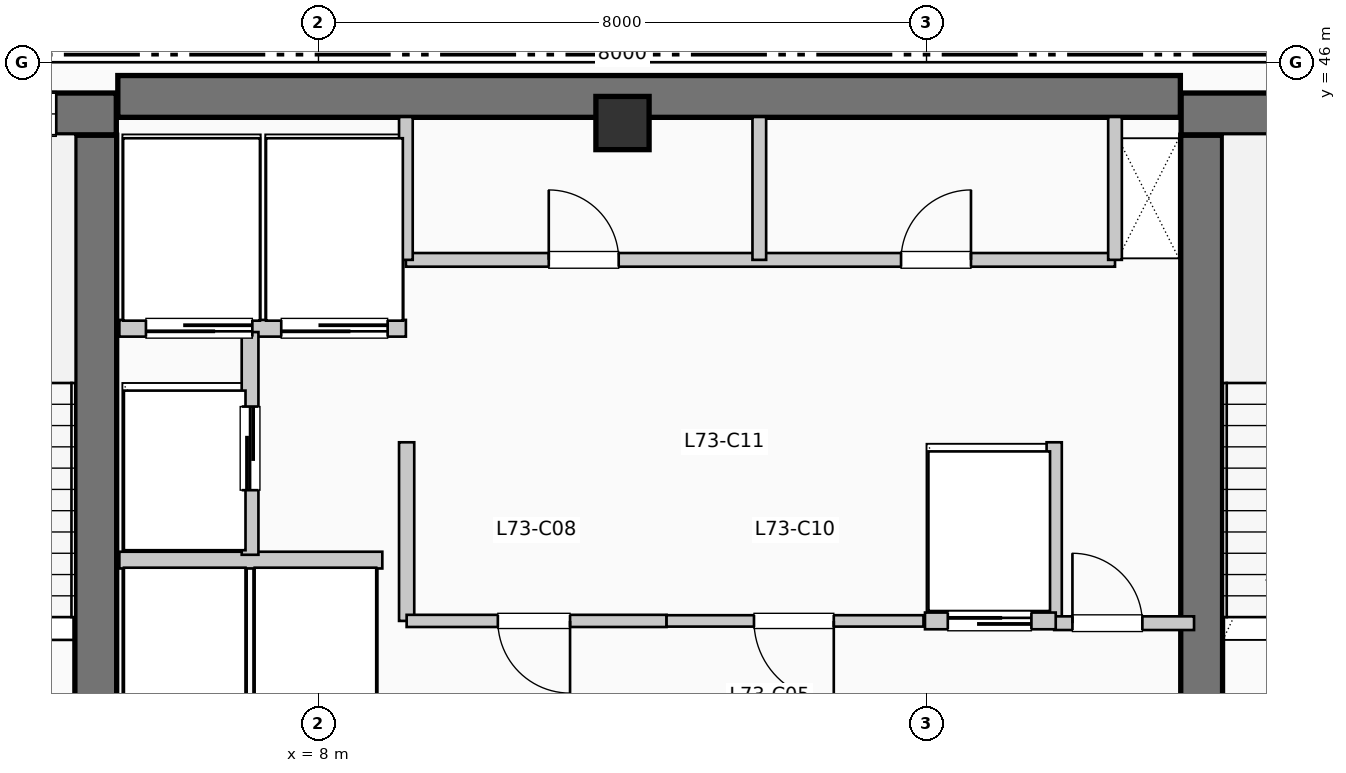
"""IFC4 building model, lengths in metres.
Left out: names, types, materials, properties, quantities, classifications, styles, units other than length and angle.
Written with IfcOpenShell. Run it as: python <this file> out.ifc"""

import sys

from ifc_helpers import new_model, si_unit, direction, frame, frame_2d, origin, origin_2d, place, context, subcontext, project, spatial, rectangle, extrude, element, fill, save


model = new_model("IFC4")
c1 = context("Model", 3, precision=1e-05, world=origin(), true_north=direction((0.0, 1.0)))
c2 = subcontext(c1, "Body", "Model", "MODEL_VIEW")
j1 = project(units=[si_unit("LENGTHUNIT", "METRE"), si_unit("PLANEANGLEUNIT", "RADIAN")], contexts=[c1])
p1 = place(None, origin())
s1 = spatial("IfcSite", under=j1, at=p1, CompositionType="ELEMENT")
p2 = place(p1, origin())
s2 = spatial("IfcBuilding", under=s1, at=p2, CompositionType="ELEMENT")
p3 = place(p2, frame((0.0, 0.0, 299.97)))
s3 = spatial("IfcBuildingStorey", under=s2, at=p3, CompositionType="ELEMENT", Elevation=299.97)
p4 = place(p3, frame((5.36, 45.55, 0.0), z_axis=(0.0, 0.0, 1.0), x_axis=(1.0, 0.0, 0.0)))
e1 = element("IfcWall", 1, at=p4, inside=s3, PredefinedType="SHEAR", context=c2, shape_type="SweptSolid", body=[
    extrude(rectangle(XDim=13.98, YDim=0.55, at=frame_2d((6.99, 0.0))), origin(), (0.0, 0.0, 1.0), 3.96),
])
p5 = place(p3, frame((5.07, 37.15, 0.0), z_axis=(0.0, 0.0, 1.0), x_axis=(0.0, 1.0, 0.0)))
e2 = element("IfcWall", 2, at=p5, inside=s3, PredefinedType="SHEAR", context=c2, shape_type="SweptSolid", body=[
    extrude(rectangle(XDim=7.89, YDim=0.55, at=frame_2d((3.945, 0.0))), origin(), (0.0, 0.0, 1.0), 3.96),
])
p6 = place(p3, frame((1.1, 45.32, 0.0), z_axis=(0.0, 0.0, 1.0), x_axis=(1.0, 0.0, 0.0)))
e3 = element("IfcWall", 3, at=p6, inside=s3, PredefinedType="SHEAR", context=c2, shape_type="SweptSolid", body=[
    extrude(rectangle(XDim=4.24, YDim=0.55, at=frame_2d((2.12, 0.0))), origin(), (0.0, 0.0, 1.0), 3.96),
])
p7 = place(p6, frame((2.05, 0.0, 1.05)))
e4 = element("IfcOpeningElement", 4, at=p7, cuts=e3, PredefinedType="OPENING", context=c2, shape_type="SweptSolid", body=[
    extrude(rectangle(XDim=1.4, YDim=1.8, at=frame_2d((0.7, 0.9))), frame((0.0, 0.285, 0.0), z_axis=(0.0, -1.0, 0.0), x_axis=(1.0, 0.0, 0.0)), (0.0, 0.0, 1.0), 0.57),
])
p8 = place(p3, frame((19.62, 37.15, 0.0), z_axis=(0.0, 0.0, 1.0), x_axis=(0.0, 1.0, 0.0)))
e5 = element("IfcWall", 5, at=p8, inside=s3, PredefinedType="SHEAR", context=c2, shape_type="SweptSolid", body=[
    extrude(rectangle(XDim=7.89, YDim=0.55, at=frame_2d((3.945, 0.0))), origin(), (0.0, 0.0, 1.0), 3.96),
])
p9 = place(p3, frame((19.35, 45.32, 0.0), z_axis=(0.0, 0.0, 1.0), x_axis=(1.0, 0.0, 0.0)))
e6 = element("IfcWall", 6, at=p9, inside=s3, PredefinedType="SHEAR", context=c2, shape_type="SweptSolid", body=[
    extrude(rectangle(XDim=3.69, YDim=0.55, at=frame_2d((1.845, 0.0))), origin(), (0.0, 0.0, 1.0), 3.96),
])
p10 = place(p9, frame((1.15, 0.0, 1.05)))
e7 = element("IfcOpeningElement", 7, at=p10, cuts=e6, PredefinedType="OPENING", context=c2, shape_type="SweptSolid", body=[
    extrude(rectangle(XDim=1.4, YDim=1.8, at=frame_2d((0.7, 0.9))), frame((0.0, 0.285, 0.0), z_axis=(0.0, -1.0, 0.0), x_axis=(1.0, 0.0, 0.0)), (0.0, 0.0, 1.0), 0.57),
])
p11 = place(p3, frame((12.0, 45.2, 0.0), z_axis=(0.0, 0.0, 1.0), x_axis=(1.0, 0.0, 0.0)))
e8 = element("IfcColumn", 8, at=p11, inside=s3, PredefinedType="COLUMN", context=c2, shape_type="SweptSolid", body=[
    extrude(rectangle(XDim=0.7, YDim=0.7, at=origin_2d()), origin(), (0.0, 0.0, 1.0), 3.96),
])
p12 = place(p3, frame((5.38, 39.45, 0.0), z_axis=(0.0, 0.0, 1.0), x_axis=(1.0, 0.0, 0.0)))
e9 = element("IfcWall", 9, at=p12, inside=s3, PredefinedType="PARTITIONING", context=c2, shape_type="SweptSolid", body=[
    extrude(rectangle(XDim=3.46, YDim=0.22, at=frame_2d((1.73, 0.0))), origin(), (0.0, 0.0, 1.0), 3.74),
])
p13 = place(p3, frame((5.38, 42.5, 0.0), z_axis=(0.0, 0.0, 1.0), x_axis=(1.0, 0.0, 0.0)))
e10 = element("IfcWall", 10, at=p13, inside=s3, PredefinedType="PARTITIONING", context=c2, shape_type="SweptSolid", body=[
    extrude(rectangle(XDim=3.77, YDim=0.22, at=frame_2d((1.885, 0.0))), origin(), (0.0, 0.0, 1.0), 3.74),
])
p14 = place(p13, frame((1.75, 0.0, 0.0), z_axis=(0.0, 0.0, 1.0), x_axis=(-1.0, 0.0, 0.0)))
e11 = element("IfcOpeningElement", 11, at=p14, cuts=e10, PredefinedType="OPENING", context=c2, shape_type="SweptSolid", body=[
    extrude(rectangle(XDim=1.4, YDim=2.2, at=frame_2d((0.7, 1.1))), frame((0.0, 0.12, 0.0), z_axis=(0.0, -1.0, 0.0), x_axis=(1.0, 0.0, 0.0)), (0.0, 0.0, 1.0), 0.24),
])
p15 = place(p13, frame((3.53, 0.0, 0.0), z_axis=(0.0, 0.0, 1.0), x_axis=(-1.0, 0.0, 0.0)))
e12 = element("IfcOpeningElement", 12, at=p15, cuts=e10, PredefinedType="OPENING", context=c2, shape_type="SweptSolid", body=[
    extrude(rectangle(XDim=1.4, YDim=2.2, at=frame_2d((0.7, 1.1))), frame((0.0, 0.12, 0.0), z_axis=(0.0, -1.0, 0.0), x_axis=(1.0, 0.0, 0.0)), (0.0, 0.0, 1.0), 0.24),
])
p16 = place(p3, frame((7.1, 39.52, 0.0), z_axis=(0.0, 0.0, 1.0), x_axis=(0.0, 1.0, 0.0)))
e13 = element("IfcWall", 13, at=p16, inside=s3, PredefinedType="PARTITIONING", context=c2, shape_type="SweptSolid", body=[
    extrude(rectangle(XDim=2.93, YDim=0.22, at=frame_2d((1.465, 0.0))), origin(), (0.0, 0.0, 1.0), 3.74),
])
p17 = place(p16, frame((0.85, 0.0, 0.0)))
e14 = element("IfcOpeningElement", 14, at=p17, cuts=e13, PredefinedType="OPENING", context=c2, shape_type="SweptSolid", body=[
    extrude(rectangle(XDim=1.1, YDim=2.2, at=frame_2d((0.55, 1.1))), frame((0.0, 0.12, 0.0), z_axis=(0.0, -1.0, 0.0), x_axis=(1.0, 0.0, 0.0)), (0.0, 0.0, 1.0), 0.24),
])
for number, where, z_axis, x_axis in (
    (15, (9.16, 38.65, 0.0), (0.0, 0.0, 1.0), (0.0, 1.0, 0.0)),
    (16, (17.68, 38.65, 0.0), (0.0, 0.0, 1.0), (0.0, 1.0, 0.0)),
):
    element("IfcWall", number, at=place(p3, frame(where, z_axis=z_axis, x_axis=x_axis)), inside=s3, PredefinedType="PARTITIONING", context=c2, shape_type="SweptSolid", body=[
        extrude(rectangle(XDim=2.35, YDim=0.2, at=frame_2d((1.175, 0.0))), origin(), (0.0, 0.0, 1.0), 3.74),
    ])
p18 = place(p3, frame((17.68, 38.62, 0.0), z_axis=(0.0, 0.0, 1.0), x_axis=(1.0, 0.0, 0.0)))
e17 = element("IfcWall", 17, at=p18, inside=s3, PredefinedType="PARTITIONING", context=c2, shape_type="SweptSolid", body=[
    extrude(rectangle(XDim=1.84, YDim=0.18, at=frame_2d((0.92, 0.0))), origin(), (0.0, 0.0, 1.0), 3.74),
])
p19 = place(p18, frame((0.24, 0.0, 0.0)))
e18 = element("IfcOpeningElement", 18, at=p19, cuts=e17, PredefinedType="OPENING", context=c2, shape_type="SweptSolid", body=[
    extrude(rectangle(XDim=0.92, YDim=2.1, at=frame_2d((0.46, 1.05))), frame((0.0, 0.1, 0.0), z_axis=(0.0, -1.0, 0.0), x_axis=(1.0, 0.0, 0.0)), (0.0, 0.0, 1.0), 0.2),
])
p20 = place(p3, frame((9.16, 38.65, 0.0), z_axis=(0.0, 0.0, 1.0), x_axis=(1.0, 0.0, 0.0)))
e19 = element("IfcWall", 19, at=p20, inside=s3, PredefinedType="PARTITIONING", context=c2, shape_type="SweptSolid", body=[
    extrude(rectangle(XDim=3.42, YDim=0.16, at=frame_2d((1.71, 0.0))), origin(), (0.0, 0.0, 1.0), 3.74),
])
p21 = place(p20, frame((2.15, 0.0, 0.0), z_axis=(0.0, 0.0, 1.0), x_axis=(-1.0, 0.0, 0.0)))
e20 = element("IfcOpeningElement", 20, at=p21, cuts=e19, PredefinedType="OPENING", context=c2, shape_type="SweptSolid", body=[
    extrude(rectangle(XDim=0.95, YDim=2.15, at=frame_2d((0.475, 1.075))), frame((0.0, 0.09, 0.0), z_axis=(0.0, -1.0, 0.0), x_axis=(1.0, 0.0, 0.0)), (0.0, 0.0, 1.0), 0.18),
])
p22 = place(p3, frame((12.58, 38.65, 0.0), z_axis=(0.0, 0.0, 1.0), x_axis=(1.0, 0.0, 0.0)))
e21 = element("IfcWall", 21, at=p22, inside=s3, PredefinedType="PARTITIONING", context=c2, shape_type="SweptSolid", body=[
    extrude(rectangle(XDim=3.38, YDim=0.15, at=frame_2d((1.69, 0.0))), origin(), (0.0, 0.0, 1.0), 3.74),
])
p23 = place(p22, frame((2.2, 0.0, 0.0), z_axis=(0.0, 0.0, 1.0), x_axis=(-1.0, 0.0, 0.0)))
e22 = element("IfcOpeningElement", 22, at=p23, cuts=e21, PredefinedType="OPENING", context=c2, shape_type="SweptSolid", body=[
    extrude(rectangle(XDim=1.05, YDim=2.15, at=frame_2d((0.525, 1.075))), frame((0.0, 0.085, 0.0), z_axis=(0.0, -1.0, 0.0), x_axis=(1.0, 0.0, 0.0)), (0.0, 0.0, 1.0), 0.17),
])
p24 = place(p3, frame((15.98, 38.65, 0.0), z_axis=(0.0, 0.0, 1.0), x_axis=(1.0, 0.0, 0.0)))
e23 = element("IfcWall", 23, at=p24, inside=s3, PredefinedType="PARTITIONING", context=c2, shape_type="SweptSolid", body=[
    extrude(rectangle(XDim=1.72, YDim=0.22, at=frame_2d((0.86, 0.0))), origin(), (0.0, 0.0, 1.0), 3.74),
])
p25 = place(p24, frame((0.3, 0.0, 0.0)))
e24 = element("IfcOpeningElement", 24, at=p25, cuts=e23, PredefinedType="OPENING", context=c2, shape_type="SweptSolid", body=[
    extrude(rectangle(XDim=1.1, YDim=2.2, at=frame_2d((0.55, 1.1))), frame((0.0, 0.12, 0.0), z_axis=(0.0, -1.0, 0.0), x_axis=(1.0, 0.0, 0.0)), (0.0, 0.0, 1.0), 0.24),
])
p26 = place(p3, frame((9.15, 43.4, 0.0), z_axis=(0.0, 0.0, 1.0), x_axis=(1.0, 0.0, 0.0)))
e25 = element("IfcWall", 25, at=p26, inside=s3, PredefinedType="PLUMBINGWALL", context=c2, shape_type="SweptSolid", body=[
    extrude(rectangle(XDim=9.33, YDim=0.18, at=frame_2d((4.665, 0.0))), origin(), (0.0, 0.0, 1.0), 3.74),
])
p27 = place(p26, frame((1.88, 0.0, 0.0)))
e26 = element("IfcOpeningElement", 26, at=p27, cuts=e25, PredefinedType="OPENING", context=c2, shape_type="SweptSolid", body=[
    extrude(rectangle(XDim=0.92, YDim=2.1, at=frame_2d((0.46, 1.05))), frame((0.0, 0.1, 0.0), z_axis=(0.0, -1.0, 0.0), x_axis=(1.0, 0.0, 0.0)), (0.0, 0.0, 1.0), 0.2),
])
p28 = place(p26, frame((6.515, 0.0, 0.0)))
e27 = element("IfcOpeningElement", 27, at=p28, cuts=e25, PredefinedType="OPENING", context=c2, shape_type="SweptSolid", body=[
    extrude(rectangle(XDim=0.92, YDim=2.1, at=frame_2d((0.46, 1.05))), frame((0.0, 0.1, 0.0), z_axis=(0.0, -1.0, 0.0), x_axis=(1.0, 0.0, 0.0)), (0.0, 0.0, 1.0), 0.2),
])
for number, where, z_axis, x_axis in (
    (28, (9.15, 43.4, 0.0), (0.0, 0.0, 1.0), (0.0, 1.0, 0.0)),
    (29, (18.48, 43.4, 0.0), (0.0, 0.0, 1.0), (0.0, 1.0, 0.0)),
    (30, (13.8, 43.4, 0.0), (0.0, 0.0, 1.0), (0.0, 1.0, 0.0)),
):
    element("IfcWall", number, at=place(p3, frame(where, z_axis=z_axis, x_axis=x_axis)), inside=s3, PredefinedType="PLUMBINGWALL", context=c2, shape_type="SweptSolid", body=[
        extrude(rectangle(XDim=1.88, YDim=0.18, at=frame_2d((0.94, 0.0))), origin(), (0.0, 0.0, 1.0), 3.74),
    ])
p29 = place(p7, origin())
e31 = element("IfcWindow", 31, at=p29, inside=s3, PartitioningType="SINGLE_PANEL", PredefinedType="WINDOW", context=c2, shape_type="SweptSolid", body=[
    extrude(rectangle(XDim=1.4, YDim=1.8, at=frame_2d((0.7, 0.9))), frame((0.0, 0.03, 0.0), z_axis=(0.0, -1.0, 0.0), x_axis=(1.0, 0.0, 0.0)), (0.0, 0.0, 1.0), 0.06),
])
fill(e4, e31)
p30 = place(p14, origin())
e32 = element("IfcDoor", 32, at=p30, inside=s3, OperationType="SLIDING_TO_LEFT", PredefinedType="DOOR", context=c2, shape_type="SweptSolid", body=[
    extrude(rectangle(XDim=1.4, YDim=2.2, at=frame_2d((0.7, 1.1))), frame((0.0, 0.025, 0.0), z_axis=(0.0, -1.0, 0.0), x_axis=(1.0, 0.0, 0.0)), (0.0, 0.0, 1.0), 0.05),
])
fill(e11, e32)
p31 = place(p15, origin())
e33 = element("IfcDoor", 33, at=p31, inside=s3, OperationType="SLIDING_TO_LEFT", PredefinedType="DOOR", context=c2, shape_type="SweptSolid", body=[
    extrude(rectangle(XDim=1.4, YDim=2.2, at=frame_2d((0.7, 1.1))), frame((0.0, 0.025, 0.0), z_axis=(0.0, -1.0, 0.0), x_axis=(1.0, 0.0, 0.0)), (0.0, 0.0, 1.0), 0.05),
])
fill(e12, e33)
p32 = place(p17, origin())
e34 = element("IfcDoor", 34, at=p32, inside=s3, OperationType="SLIDING_TO_LEFT", PredefinedType="DOOR", context=c2, shape_type="SweptSolid", body=[
    extrude(rectangle(XDim=1.1, YDim=2.2, at=frame_2d((0.55, 1.1))), frame((0.0, 0.025, 0.0), z_axis=(0.0, -1.0, 0.0), x_axis=(1.0, 0.0, 0.0)), (0.0, 0.0, 1.0), 0.05),
])
fill(e14, e34)
p33 = place(p19, origin())
e35 = element("IfcDoor", 35, at=p33, inside=s3, OperationType="SINGLE_SWING_LEFT", PredefinedType="DOOR", context=c2, shape_type="SweptSolid", body=[
    extrude(rectangle(XDim=0.92, YDim=2.1, at=frame_2d((0.46, 1.05))), frame((0.0, 0.025, 0.0), z_axis=(0.0, -1.0, 0.0), x_axis=(1.0, 0.0, 0.0)), (0.0, 0.0, 1.0), 0.05),
])
fill(e18, e35)
p34 = place(p21, origin())
e36 = element("IfcDoor", 36, at=p34, inside=s3, OperationType="SINGLE_SWING_RIGHT", PredefinedType="DOOR", context=c2, shape_type="SweptSolid", body=[
    extrude(rectangle(XDim=0.95, YDim=2.15, at=frame_2d((0.475, 1.075))), frame((0.0, 0.025, 0.0), z_axis=(0.0, -1.0, 0.0), x_axis=(1.0, 0.0, 0.0)), (0.0, 0.0, 1.0), 0.05),
])
fill(e20, e36)
p35 = place(p23, origin())
e37 = element("IfcDoor", 37, at=p35, inside=s3, OperationType="SINGLE_SWING_RIGHT", PredefinedType="DOOR", context=c2, shape_type="SweptSolid", body=[
    extrude(rectangle(XDim=1.05, YDim=2.15, at=frame_2d((0.525, 1.075))), frame((0.0, 0.025, 0.0), z_axis=(0.0, -1.0, 0.0), x_axis=(1.0, 0.0, 0.0)), (0.0, 0.0, 1.0), 0.05),
])
fill(e22, e37)
p36 = place(p25, origin())
e38 = element("IfcDoor", 38, at=p36, inside=s3, OperationType="SLIDING_TO_LEFT", PredefinedType="DOOR", context=c2, shape_type="SweptSolid", body=[
    extrude(rectangle(XDim=1.1, YDim=2.2, at=frame_2d((0.55, 1.1))), frame((0.0, 0.025, 0.0), z_axis=(0.0, -1.0, 0.0), x_axis=(1.0, 0.0, 0.0)), (0.0, 0.0, 1.0), 0.05),
])
fill(e24, e38)
p37 = place(p27, origin())
e39 = element("IfcDoor", 39, at=p37, inside=s3, OperationType="SINGLE_SWING_LEFT", PredefinedType="DOOR", context=c2, shape_type="SweptSolid", body=[
    extrude(rectangle(XDim=0.92, YDim=2.1, at=frame_2d((0.46, 1.05))), frame((0.0, 0.025, 0.0), z_axis=(0.0, -1.0, 0.0), x_axis=(1.0, 0.0, 0.0)), (0.0, 0.0, 1.0), 0.05),
])
fill(e26, e39)
p38 = place(p28, origin())
e40 = element("IfcDoor", 40, at=p38, inside=s3, OperationType="SINGLE_SWING_RIGHT", PredefinedType="DOOR", context=c2, shape_type="SweptSolid", body=[
    extrude(rectangle(XDim=0.92, YDim=2.1, at=frame_2d((0.46, 1.05))), frame((0.0, 0.025, 0.0), z_axis=(0.0, -1.0, 0.0), x_axis=(1.0, 0.0, 0.0)), (0.0, 0.0, 1.0), 0.05),
])
fill(e27, e40)
save(model, sys.argv[1])
